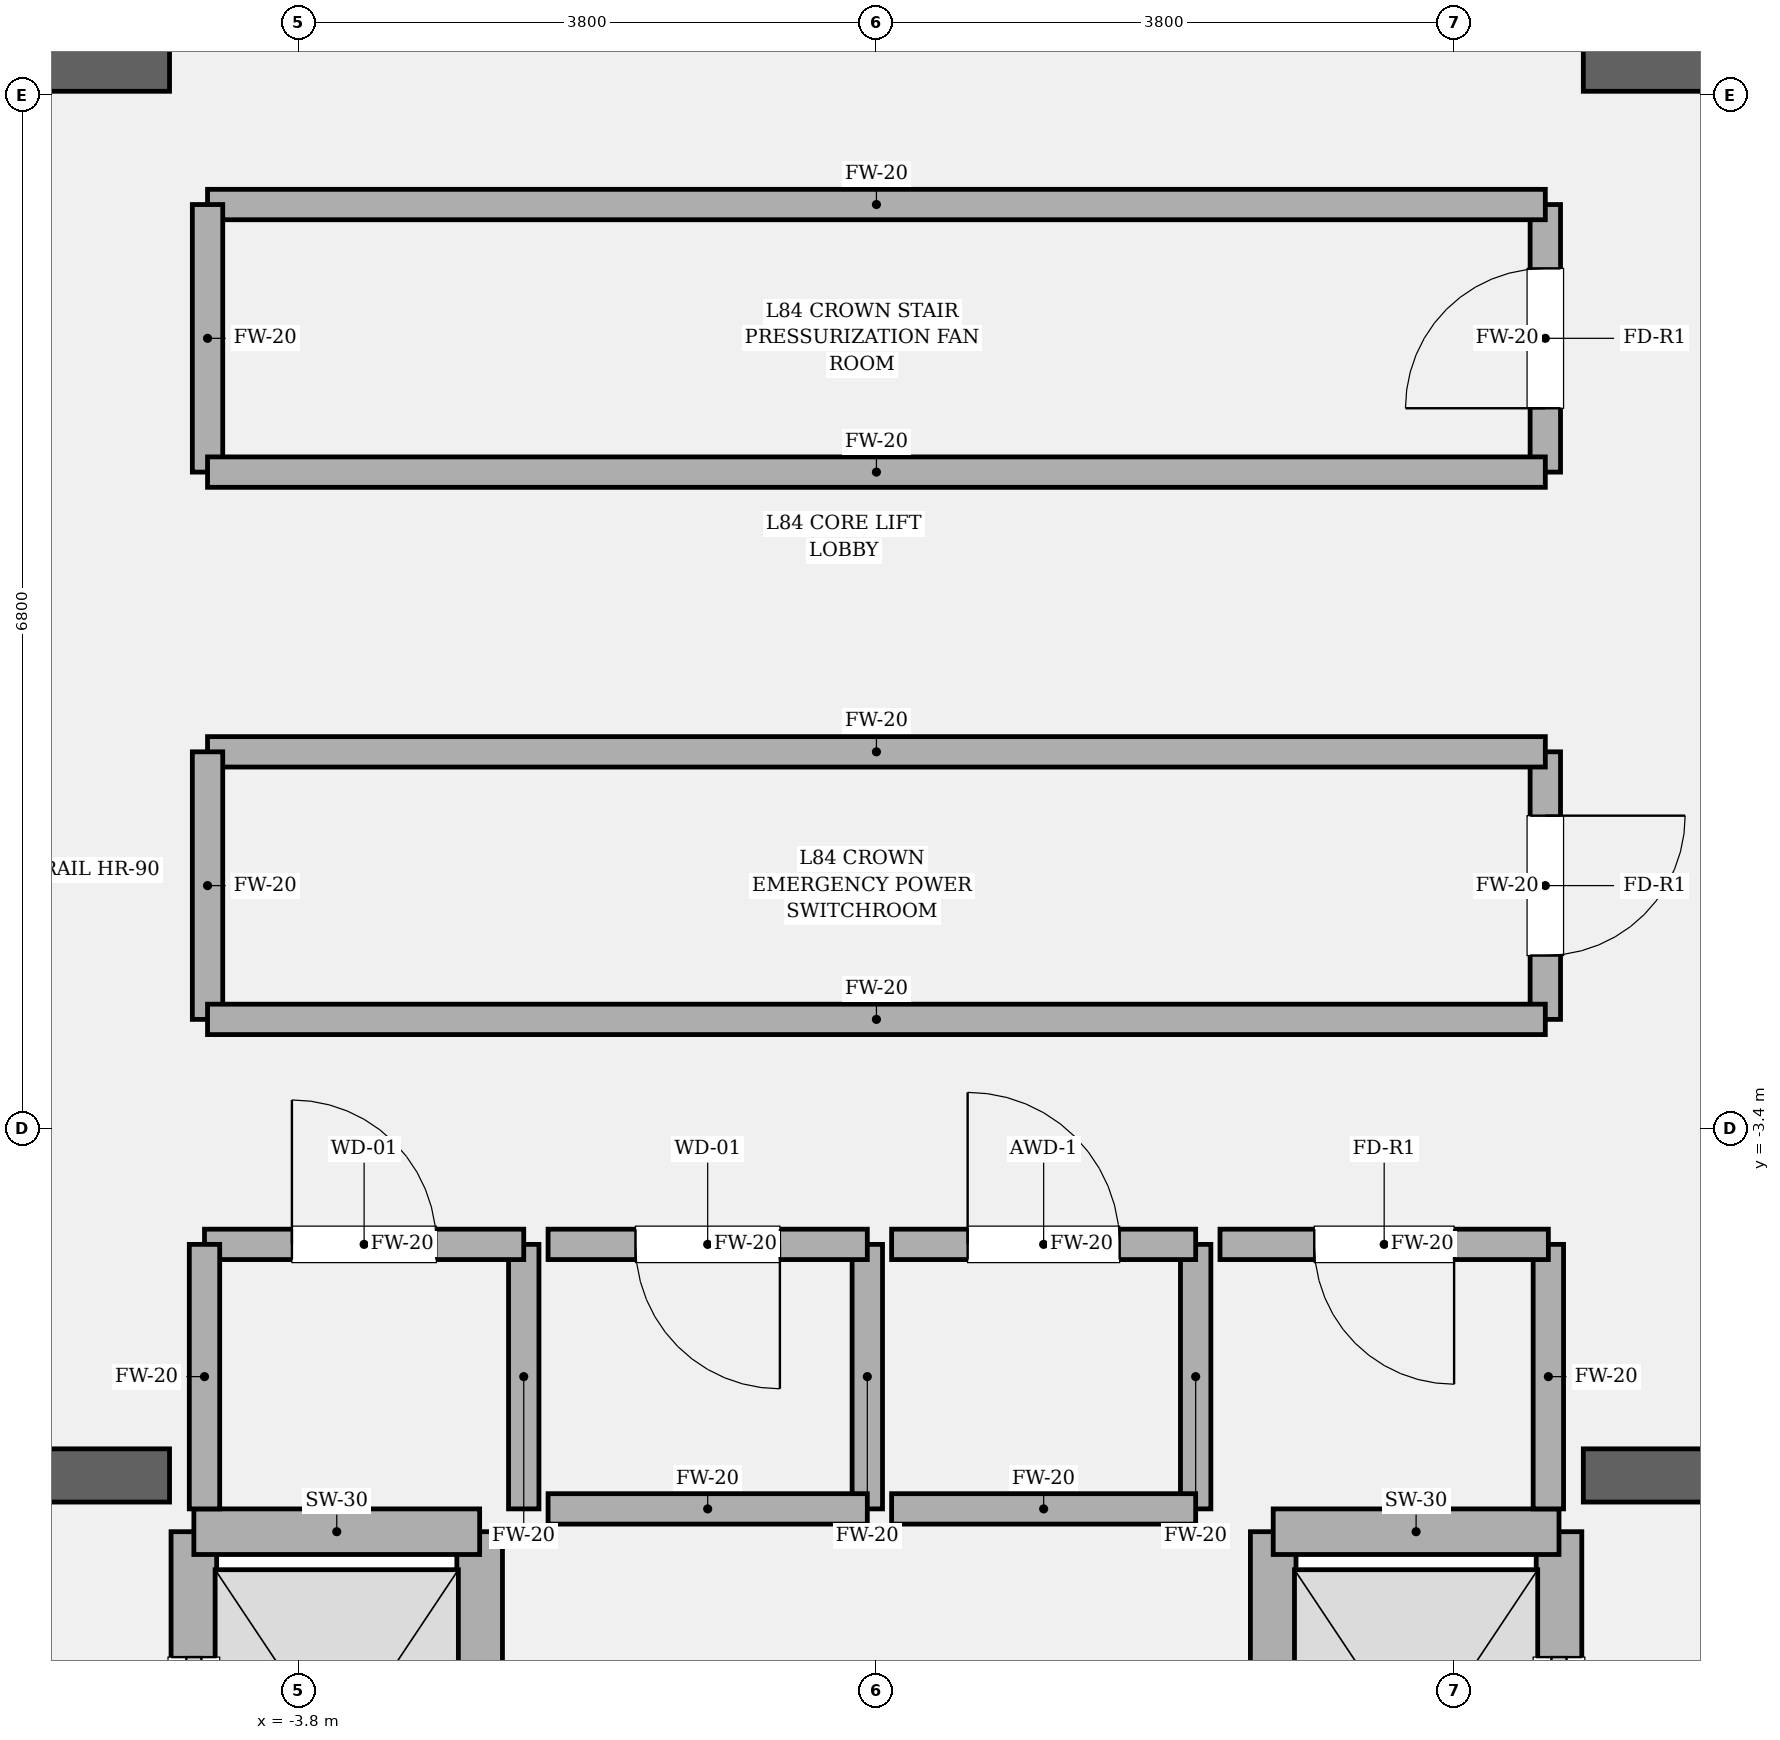
"""IFC4 building model, lengths in metres.
Left out: names, types, materials, properties, quantities, classifications, styles, units other than length and angle.
Written with IfcOpenShell. Run it as: python <this file> out.ifc"""

import sys

from ifc_helpers import new_model, si_unit, direction, frame, frame_2d, origin, place, context, subcontext, project, spatial, rectangle, extrude, element, fill, save


model = new_model("IFC4")
c1 = context("Model", 3, precision=1e-05, world=origin(), true_north=direction((0.0, 1.0)))
c2 = subcontext(c1, "Body", "Model", "MODEL_VIEW")
j1 = project(units=[si_unit("LENGTHUNIT", "METRE"), si_unit("PLANEANGLEUNIT", "RADIAN")], contexts=[c1])
p1 = place(None, origin())
s1 = spatial("IfcSite", under=j1, at=p1, CompositionType="ELEMENT")
p2 = place(p1, origin())
s2 = spatial("IfcBuilding", under=s1, at=p2, CompositionType="ELEMENT")
p3 = place(p2, frame((0.0, 0.0, 357.3)))
s3 = spatial("IfcBuildingStorey", under=s2, at=p3, CompositionType="ELEMENT", Elevation=357.3)
p4 = place(p3, frame((-9.975, -5.68, 0.0), z_axis=(0.0, 0.0, 1.0), x_axis=(1.0, 0.0, 0.0)))
e1 = element("IfcWall", 1, at=p4, inside=s3, PredefinedType="SOLIDWALL", context=c2, shape_type="SweptSolid", body=[
    extrude(rectangle(XDim=5.325, YDim=0.35, at=frame_2d((2.663, 0.0))), origin(), (0.0, 0.0, 1.0), 4.5),
])
p5 = place(p4, frame((1.435, 0.0, 0.0)))
e2 = element("IfcOpeningElement", 2, at=p5, cuts=e1, PredefinedType="OPENING", context=c2, shape_type="SweptSolid", body=[
    extrude(rectangle(XDim=1.18, YDim=2.2, at=frame_2d((0.59, 1.1))), frame((0.0, 0.185, 0.0), z_axis=(0.0, -1.0, 0.0), x_axis=(1.0, 0.0, 0.0)), (0.0, 0.0, 1.0), 0.37),
])
p6 = place(p3, frame((4.65, -5.68, 0.0), z_axis=(0.0, 0.0, 1.0), x_axis=(1.0, 0.0, 0.0)))
e3 = element("IfcWall", 3, at=p6, inside=s3, PredefinedType="SOLIDWALL", context=c2, shape_type="SweptSolid", body=[
    extrude(rectangle(XDim=5.325, YDim=0.35, at=frame_2d((2.663, 0.0))), origin(), (0.0, 0.0, 1.0), 4.5),
])
p7 = place(p6, frame((2.71, 0.0, 0.0)))
e4 = element("IfcOpeningElement", 4, at=p7, cuts=e3, PredefinedType="OPENING", context=c2, shape_type="SweptSolid", body=[
    extrude(rectangle(XDim=1.18, YDim=2.2, at=frame_2d((0.59, 1.1))), frame((0.0, 0.185, 0.0), z_axis=(0.0, -1.0, 0.0), x_axis=(1.0, 0.0, 0.0)), (0.0, 0.0, 1.0), 0.37),
])
for number, where, z_axis, x_axis in (
    (5, (-9.975, 3.6, 0.0), (0.0, 0.0, 1.0), (1.0, 0.0, 0.0)),
    (6, (4.65, 3.6, 0.0), (0.0, 0.0, 1.0), (1.0, 0.0, 0.0)),
):
    element("IfcWall", number, at=place(p3, frame(where, z_axis=z_axis, x_axis=x_axis)), inside=s3, PredefinedType="SOLIDWALL", context=c2, shape_type="SweptSolid", body=[
        extrude(rectangle(XDim=5.325, YDim=0.35, at=frame_2d((2.663, 0.0))), origin(), (0.0, 0.0, 1.0), 4.5),
    ])
p8 = place(p3, frame((-4.49, -8.82, 0.0), z_axis=(0.0, 0.0, 1.0), x_axis=(0.0, 1.0, 0.0)))
e7 = element("IfcWall", 7, at=p8, inside=s3, PredefinedType="SOLIDWALL", context=c2, shape_type="SweptSolid", body=[
    extrude(rectangle(XDim=2.77, YDim=0.3, at=frame_2d((1.385, 0.0))), origin(), (0.0, 0.0, 1.0), 4.22),
])
p9 = place(p8, frame((0.825, 0.0, 0.0)))
e8 = element("IfcOpeningElement", 8, at=p9, cuts=e7, PredefinedType="OPENING", context=c2, shape_type="SweptSolid", body=[
    extrude(rectangle(XDim=1.12, YDim=2.25, at=frame_2d((0.56, 1.125))), frame((0.0, 0.16, 0.0), z_axis=(0.0, -1.0, 0.0), x_axis=(1.0, 0.0, 0.0)), (0.0, 0.0, 1.0), 0.32),
])
p10 = place(p3, frame((-2.61, -8.82, 0.0), z_axis=(0.0, 0.0, 1.0), x_axis=(0.0, 1.0, 0.0)))
e9 = element("IfcWall", 9, at=p10, inside=s3, PredefinedType="SOLIDWALL", context=c2, shape_type="SweptSolid", body=[
    extrude(rectangle(XDim=2.77, YDim=0.3, at=frame_2d((1.385, 0.0))), origin(), (0.0, 0.0, 1.0), 4.22),
])
p11 = place(p3, frame((-4.49, -6.05, 0.0), z_axis=(0.0, 0.0, 1.0), x_axis=(1.0, 0.0, 0.0)))
e10 = element("IfcWall", 10, at=p11, inside=s3, PredefinedType="SOLIDWALL", context=c2, shape_type="SweptSolid", body=[
    extrude(rectangle(XDim=1.88, YDim=0.3, at=frame_2d((0.94, 0.0))), origin(), (0.0, 0.0, 1.0), 4.22),
])
p12 = place(p3, frame((4.49, -8.82, 0.0), z_axis=(0.0, 0.0, 1.0), x_axis=(0.0, 1.0, 0.0)))
e11 = element("IfcWall", 11, at=p12, inside=s3, PredefinedType="SOLIDWALL", context=c2, shape_type="SweptSolid", body=[
    extrude(rectangle(XDim=2.77, YDim=0.3, at=frame_2d((1.385, 0.0))), origin(), (0.0, 0.0, 1.0), 4.22),
])
p13 = place(p12, frame((0.825, 0.0, 0.0)))
e12 = element("IfcOpeningElement", 12, at=p13, cuts=e11, PredefinedType="OPENING", context=c2, shape_type="SweptSolid", body=[
    extrude(rectangle(XDim=1.12, YDim=2.25, at=frame_2d((0.56, 1.125))), frame((0.0, 0.16, 0.0), z_axis=(0.0, -1.0, 0.0), x_axis=(1.0, 0.0, 0.0)), (0.0, 0.0, 1.0), 0.32),
])
p14 = place(p3, frame((2.61, -8.82, 0.0), z_axis=(0.0, 0.0, 1.0), x_axis=(0.0, 1.0, 0.0)))
e13 = element("IfcWall", 13, at=p14, inside=s3, PredefinedType="SOLIDWALL", context=c2, shape_type="SweptSolid", body=[
    extrude(rectangle(XDim=2.77, YDim=0.3, at=frame_2d((1.385, 0.0))), origin(), (0.0, 0.0, 1.0), 4.22),
])
p15 = place(p3, frame((2.61, -6.05, 0.0), z_axis=(0.0, 0.0, 1.0), x_axis=(1.0, 0.0, 0.0)))
e14 = element("IfcWall", 14, at=p15, inside=s3, PredefinedType="SOLIDWALL", context=c2, shape_type="SweptSolid", body=[
    extrude(rectangle(XDim=1.88, YDim=0.3, at=frame_2d((0.94, 0.0))), origin(), (0.0, 0.0, 1.0), 4.22),
])
p16 = place(p3, frame((-2.32, -5.9, 0.0), z_axis=(0.0, 0.0, 1.0), x_axis=(0.0, 1.0, 0.0)))
e15 = element("IfcWall", 15, at=p16, inside=s3, PredefinedType="SOLIDWALL", context=c2, shape_type="SweptSolid", body=[
    extrude(rectangle(XDim=1.74, YDim=0.2, at=frame_2d((0.87, 0.0))), origin(), (0.0, 0.0, 1.0), 4.22),
])
p17 = place(p3, frame((-2.32, -4.16, 0.0), z_axis=(0.0, 0.0, 1.0), x_axis=(-1.0, 0.0, 0.0)))
e16 = element("IfcWall", 16, at=p17, inside=s3, PredefinedType="SOLIDWALL", context=c2, shape_type="SweptSolid", body=[
    extrude(rectangle(XDim=2.1, YDim=0.2, at=frame_2d((1.05, 0.0))), origin(), (0.0, 0.0, 1.0), 4.22),
])
p18 = place(p17, frame((0.575, 0.0, 0.0)))
e17 = element("IfcOpeningElement", 17, at=p18, cuts=e16, PredefinedType="OPENING", context=c2, shape_type="SweptSolid", body=[
    extrude(rectangle(XDim=0.95, YDim=2.15, at=frame_2d((0.475, 1.075))), frame((0.0, 0.11, 0.0), z_axis=(0.0, -1.0, 0.0), x_axis=(1.0, 0.0, 0.0)), (0.0, 0.0, 1.0), 0.22),
])
for number, where, z_axis, x_axis in (
    (18, (-4.42, -4.16, 0.0), (0.0, 0.0, 1.0), (0.0, -1.0, 0.0)),
    (19, (-0.06, -5.9, 0.0), (0.0, 0.0, 1.0), (0.0, 1.0, 0.0)),
):
    element("IfcWall", number, at=place(p3, frame(where, z_axis=z_axis, x_axis=x_axis)), inside=s3, PredefinedType="SOLIDWALL", context=c2, shape_type="SweptSolid", body=[
        extrude(rectangle(XDim=1.74, YDim=0.2, at=frame_2d((0.87, 0.0))), origin(), (0.0, 0.0, 1.0), 4.22),
    ])
p19 = place(p3, frame((-0.06, -4.16, 0.0), z_axis=(0.0, 0.0, 1.0), x_axis=(-1.0, 0.0, 0.0)))
e20 = element("IfcWall", 20, at=p19, inside=s3, PredefinedType="SOLIDWALL", context=c2, shape_type="SweptSolid", body=[
    extrude(rectangle(XDim=2.1, YDim=0.2, at=frame_2d((1.05, 0.0))), origin(), (0.0, 0.0, 1.0), 4.22),
])
p20 = place(p19, frame((0.575, 0.0, 0.0)))
e21 = element("IfcOpeningElement", 21, at=p20, cuts=e20, PredefinedType="OPENING", context=c2, shape_type="SweptSolid", body=[
    extrude(rectangle(XDim=0.95, YDim=2.15, at=frame_2d((0.475, 1.075))), frame((0.0, 0.11, 0.0), z_axis=(0.0, -1.0, 0.0), x_axis=(1.0, 0.0, 0.0)), (0.0, 0.0, 1.0), 0.22),
])
p21 = place(p3, frame((-2.16, -5.9, 0.0), z_axis=(0.0, 0.0, 1.0), x_axis=(1.0, 0.0, 0.0)))
e22 = element("IfcWall", 22, at=p21, inside=s3, PredefinedType="SOLIDWALL", context=c2, shape_type="SweptSolid", body=[
    extrude(rectangle(XDim=2.1, YDim=0.2, at=frame_2d((1.05, 0.0))), origin(), (0.0, 0.0, 1.0), 4.22),
])
p22 = place(p3, frame((2.1, -5.9, 0.0), z_axis=(0.0, 0.0, 1.0), x_axis=(0.0, 1.0, 0.0)))
e23 = element("IfcWall", 23, at=p22, inside=s3, PredefinedType="SOLIDWALL", context=c2, shape_type="SweptSolid", body=[
    extrude(rectangle(XDim=1.74, YDim=0.2, at=frame_2d((0.87, 0.0))), origin(), (0.0, 0.0, 1.0), 4.22),
])
p23 = place(p3, frame((2.1, -4.16, 0.0), z_axis=(0.0, 0.0, 1.0), x_axis=(-1.0, 0.0, 0.0)))
e24 = element("IfcWall", 24, at=p23, inside=s3, PredefinedType="SOLIDWALL", context=c2, shape_type="SweptSolid", body=[
    extrude(rectangle(XDim=2.0, YDim=0.2, at=frame_2d((1.0, 0.0))), origin(), (0.0, 0.0, 1.0), 4.22),
])
p24 = place(p23, frame((0.5, 0.0, 0.0)))
e25 = element("IfcOpeningElement", 25, at=p24, cuts=e24, PredefinedType="OPENING", context=c2, shape_type="SweptSolid", body=[
    extrude(rectangle(XDim=1.0, YDim=2.15, at=frame_2d((0.5, 1.075))), frame((0.0, 0.11, 0.0), z_axis=(0.0, -1.0, 0.0), x_axis=(1.0, 0.0, 0.0)), (0.0, 0.0, 1.0), 0.22),
])
p25 = place(p3, frame((0.1, -5.9, 0.0), z_axis=(0.0, 0.0, 1.0), x_axis=(1.0, 0.0, 0.0)))
e26 = element("IfcWall", 26, at=p25, inside=s3, PredefinedType="SOLIDWALL", context=c2, shape_type="SweptSolid", body=[
    extrude(rectangle(XDim=2.0, YDim=0.2, at=frame_2d((1.0, 0.0))), origin(), (0.0, 0.0, 1.0), 4.22),
])
p26 = place(p3, frame((4.42, -5.9, 0.0), z_axis=(0.0, 0.0, 1.0), x_axis=(0.0, 1.0, 0.0)))
e27 = element("IfcWall", 27, at=p26, inside=s3, PredefinedType="SOLIDWALL", context=c2, shape_type="SweptSolid", body=[
    extrude(rectangle(XDim=1.74, YDim=0.2, at=frame_2d((0.87, 0.0))), origin(), (0.0, 0.0, 1.0), 4.22),
])
p27 = place(p3, frame((4.42, -4.16, 0.0), z_axis=(0.0, 0.0, 1.0), x_axis=(-1.0, 0.0, 0.0)))
e28 = element("IfcWall", 28, at=p27, inside=s3, PredefinedType="SOLIDWALL", context=c2, shape_type="SweptSolid", body=[
    extrude(rectangle(XDim=2.16, YDim=0.2, at=frame_2d((1.08, 0.0))), origin(), (0.0, 0.0, 1.0), 4.22),
])
p28 = place(p27, frame((0.62, 0.0, 0.0)))
e29 = element("IfcOpeningElement", 29, at=p28, cuts=e28, PredefinedType="OPENING", context=c2, shape_type="SweptSolid", body=[
    extrude(rectangle(XDim=0.92, YDim=2.1, at=frame_2d((0.46, 1.05))), frame((0.0, 0.11, 0.0), z_axis=(0.0, -1.0, 0.0), x_axis=(1.0, 0.0, 0.0)), (0.0, 0.0, 1.0), 0.22),
])
p29 = place(p3, frame((4.4, -2.68, 0.0), z_axis=(0.0, 0.0, 1.0), x_axis=(0.0, 1.0, 0.0)))
e30 = element("IfcWall", 30, at=p29, inside=s3, PredefinedType="SOLIDWALL", context=c2, shape_type="SweptSolid", body=[
    extrude(rectangle(XDim=1.76, YDim=0.2, at=frame_2d((0.88, 0.0))), origin(), (0.0, 0.0, 1.0), 4.22),
])
p30 = place(p29, frame((0.42, 0.0, 0.0)))
e31 = element("IfcOpeningElement", 31, at=p30, cuts=e30, PredefinedType="OPENING", context=c2, shape_type="SweptSolid", body=[
    extrude(rectangle(XDim=0.92, YDim=2.1, at=frame_2d((0.46, 1.05))), frame((0.0, 0.11, 0.0), z_axis=(0.0, -1.0, 0.0), x_axis=(1.0, 0.0, 0.0)), (0.0, 0.0, 1.0), 0.22),
])
p31 = place(p3, frame((4.4, -0.92, 0.0), z_axis=(0.0, 0.0, 1.0), x_axis=(-1.0, 0.0, 0.0)))
e32 = element("IfcWall", 32, at=p31, inside=s3, PredefinedType="SOLIDWALL", context=c2, shape_type="SweptSolid", body=[
    extrude(rectangle(XDim=8.8, YDim=0.2, at=frame_2d((4.4, 0.0))), origin(), (0.0, 0.0, 1.0), 4.22),
])
p32 = place(p3, frame((-4.4, -0.92, 0.0), z_axis=(0.0, 0.0, 1.0), x_axis=(0.0, -1.0, 0.0)))
e33 = element("IfcWall", 33, at=p32, inside=s3, PredefinedType="SOLIDWALL", context=c2, shape_type="SweptSolid", body=[
    extrude(rectangle(XDim=1.76, YDim=0.2, at=frame_2d((0.88, 0.0))), origin(), (0.0, 0.0, 1.0), 4.22),
])
p33 = place(p3, frame((-4.4, -2.68, 0.0), z_axis=(0.0, 0.0, 1.0), x_axis=(1.0, 0.0, 0.0)))
e34 = element("IfcWall", 34, at=p33, inside=s3, PredefinedType="SOLIDWALL", context=c2, shape_type="SweptSolid", body=[
    extrude(rectangle(XDim=8.8, YDim=0.2, at=frame_2d((4.4, 0.0))), origin(), (0.0, 0.0, 1.0), 4.22),
])
p34 = place(p3, frame((4.4, 0.92, 0.0), z_axis=(0.0, 0.0, 1.0), x_axis=(0.0, 1.0, 0.0)))
e35 = element("IfcWall", 35, at=p34, inside=s3, PredefinedType="SOLIDWALL", context=c2, shape_type="SweptSolid", body=[
    extrude(rectangle(XDim=1.76, YDim=0.2, at=frame_2d((0.88, 0.0))), origin(), (0.0, 0.0, 1.0), 4.22),
])
p35 = place(p34, frame((0.42, 0.0, 0.0)))
e36 = element("IfcOpeningElement", 36, at=p35, cuts=e35, PredefinedType="OPENING", context=c2, shape_type="SweptSolid", body=[
    extrude(rectangle(XDim=0.92, YDim=2.1, at=frame_2d((0.46, 1.05))), frame((0.0, 0.11, 0.0), z_axis=(0.0, -1.0, 0.0), x_axis=(1.0, 0.0, 0.0)), (0.0, 0.0, 1.0), 0.22),
])
p36 = place(p3, frame((4.4, 2.68, 0.0), z_axis=(0.0, 0.0, 1.0), x_axis=(-1.0, 0.0, 0.0)))
e37 = element("IfcWall", 37, at=p36, inside=s3, PredefinedType="SOLIDWALL", context=c2, shape_type="SweptSolid", body=[
    extrude(rectangle(XDim=8.8, YDim=0.2, at=frame_2d((4.4, 0.0))), origin(), (0.0, 0.0, 1.0), 4.22),
])
p37 = place(p3, frame((-4.4, 2.68, 0.0), z_axis=(0.0, 0.0, 1.0), x_axis=(0.0, -1.0, 0.0)))
e38 = element("IfcWall", 38, at=p37, inside=s3, PredefinedType="SOLIDWALL", context=c2, shape_type="SweptSolid", body=[
    extrude(rectangle(XDim=1.76, YDim=0.2, at=frame_2d((0.88, 0.0))), origin(), (0.0, 0.0, 1.0), 4.22),
])
p38 = place(p3, frame((-4.4, 0.92, 0.0), z_axis=(0.0, 0.0, 1.0), x_axis=(1.0, 0.0, 0.0)))
e39 = element("IfcWall", 39, at=p38, inside=s3, PredefinedType="SOLIDWALL", context=c2, shape_type="SweptSolid", body=[
    extrude(rectangle(XDim=8.8, YDim=0.2, at=frame_2d((4.4, 0.0))), origin(), (0.0, 0.0, 1.0), 4.22),
])
p39 = place(p9, origin())
e40 = element("IfcDoor", 40, at=p39, inside=s3, OperationType="SLIDING_TO_LEFT", PredefinedType="DOOR", context=c2, shape_type="SweptSolid", body=[
    extrude(rectangle(XDim=1.12, YDim=2.25, at=frame_2d((0.56, 1.125))), frame((0.0, 0.025, 0.0), z_axis=(0.0, -1.0, 0.0), x_axis=(1.0, 0.0, 0.0)), (0.0, 0.0, 1.0), 0.05),
])
fill(e8, e40)
p40 = place(p13, origin())
e41 = element("IfcDoor", 41, at=p40, inside=s3, OperationType="SLIDING_TO_RIGHT", PredefinedType="DOOR", context=c2, shape_type="SweptSolid", body=[
    extrude(rectangle(XDim=1.12, YDim=2.25, at=frame_2d((0.56, 1.125))), frame((0.0, 0.025, 0.0), z_axis=(0.0, -1.0, 0.0), x_axis=(1.0, 0.0, 0.0)), (0.0, 0.0, 1.0), 0.05),
])
fill(e12, e41)
p41 = place(p18, origin())
e42 = element("IfcDoor", 42, at=p41, inside=s3, OperationType="SINGLE_SWING_RIGHT", PredefinedType="DOOR", context=c2, shape_type="SweptSolid", body=[
    extrude(rectangle(XDim=0.95, YDim=2.15, at=frame_2d((0.475, 1.075))), frame((0.0, 0.025, 0.0), z_axis=(0.0, -1.0, 0.0), x_axis=(1.0, 0.0, 0.0)), (0.0, 0.0, 1.0), 0.05),
])
fill(e17, e42)
p42 = place(p20, origin())
e43 = element("IfcDoor", 43, at=p42, inside=s3, OperationType="SINGLE_SWING_LEFT", PredefinedType="DOOR", context=c2, shape_type="SweptSolid", body=[
    extrude(rectangle(XDim=0.95, YDim=2.15, at=frame_2d((0.475, 1.075))), frame((0.0, 0.025, 0.0), z_axis=(0.0, -1.0, 0.0), x_axis=(1.0, 0.0, 0.0)), (0.0, 0.0, 1.0), 0.05),
])
fill(e21, e43)
p43 = place(p24, origin())
e44 = element("IfcDoor", 44, at=p43, inside=s3, OperationType="SINGLE_SWING_RIGHT", PredefinedType="DOOR", context=c2, shape_type="SweptSolid", body=[
    extrude(rectangle(XDim=1.0, YDim=2.15, at=frame_2d((0.5, 1.075))), frame((0.0, 0.025, 0.0), z_axis=(0.0, -1.0, 0.0), x_axis=(1.0, 0.0, 0.0)), (0.0, 0.0, 1.0), 0.05),
])
fill(e25, e44)
p44 = place(p28, origin())
e45 = element("IfcDoor", 45, at=p44, inside=s3, OperationType="SINGLE_SWING_LEFT", PredefinedType="DOOR", context=c2, shape_type="SweptSolid", body=[
    extrude(rectangle(XDim=0.92, YDim=2.1, at=frame_2d((0.46, 1.05))), frame((0.0, 0.025, 0.0), z_axis=(0.0, -1.0, 0.0), x_axis=(1.0, 0.0, 0.0)), (0.0, 0.0, 1.0), 0.05),
])
fill(e29, e45)
p45 = place(p30, origin())
e46 = element("IfcDoor", 46, at=p45, inside=s3, OperationType="SINGLE_SWING_RIGHT", PredefinedType="DOOR", context=c2, shape_type="SweptSolid", body=[
    extrude(rectangle(XDim=0.92, YDim=2.1, at=frame_2d((0.46, 1.05))), frame((0.0, 0.025, 0.0), z_axis=(0.0, -1.0, 0.0), x_axis=(1.0, 0.0, 0.0)), (0.0, 0.0, 1.0), 0.05),
])
fill(e31, e46)
p46 = place(p35, origin())
e47 = element("IfcDoor", 47, at=p46, inside=s3, OperationType="SINGLE_SWING_LEFT", PredefinedType="DOOR", context=c2, shape_type="SweptSolid", body=[
    extrude(rectangle(XDim=0.92, YDim=2.1, at=frame_2d((0.46, 1.05))), frame((0.0, 0.025, 0.0), z_axis=(0.0, -1.0, 0.0), x_axis=(1.0, 0.0, 0.0)), (0.0, 0.0, 1.0), 0.05),
])
fill(e36, e47)
save(model, sys.argv[1])
